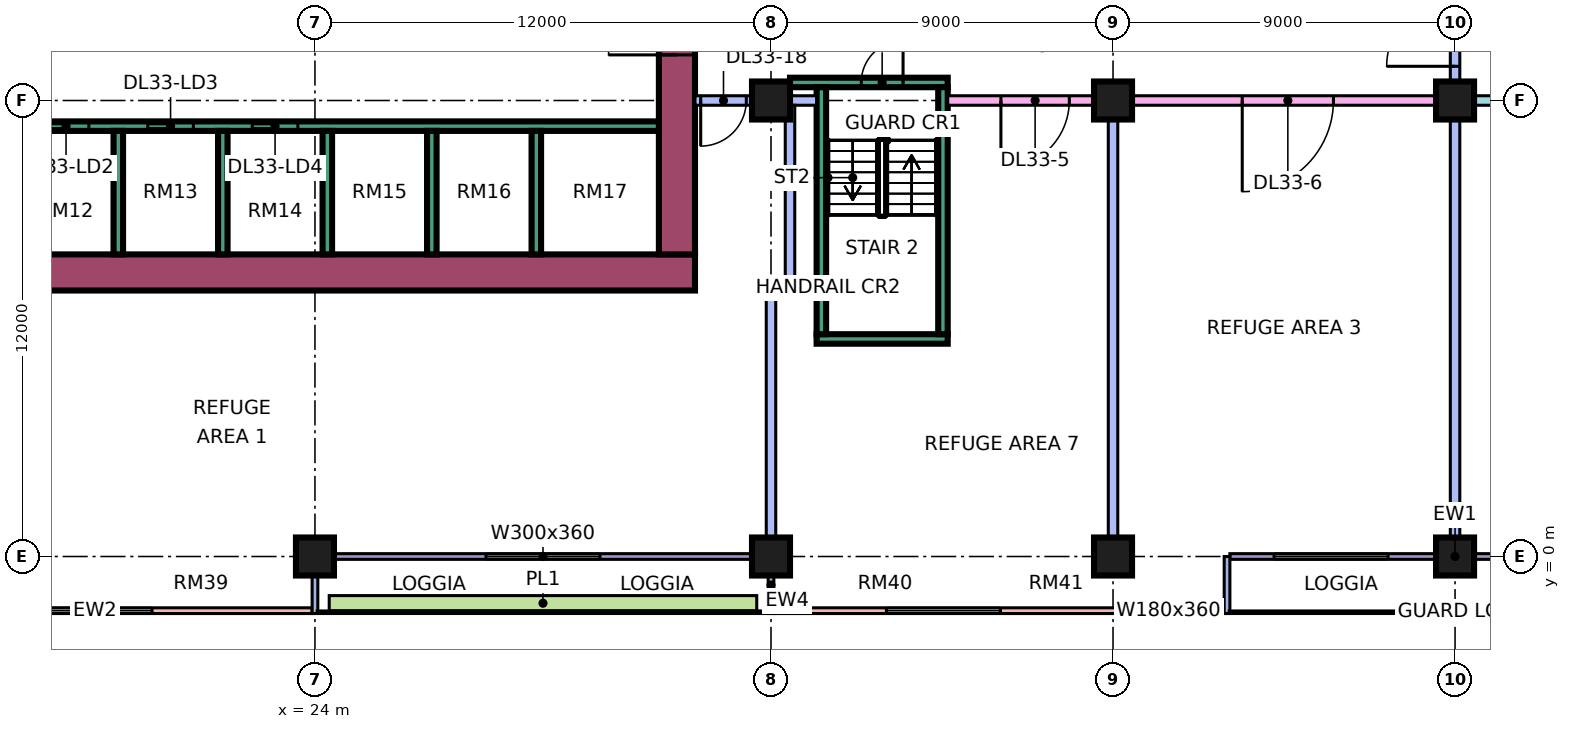
"""IFC4 building model, lengths in metres.
Left out: names, types, materials, properties, quantities, classifications, styles, units other than length and angle.
Written with IfcOpenShell. Run it as: python <this file> out.ifc"""

import sys

from ifc_helpers import new_model, si_unit, direction, frame, frame_2d, origin, origin_2d, place, context, subcontext, project, spatial, rectangle, extrude, element, fill, save


model = new_model("IFC4")
c1 = context("Model", 3, precision=1e-05, world=origin(), true_north=direction((0.0, 1.0)))
c2 = subcontext(c1, "Body", "Model", "MODEL_VIEW")
j1 = project(units=[si_unit("LENGTHUNIT", "METRE"), si_unit("PLANEANGLEUNIT", "RADIAN")], contexts=[c1])
p1 = place(None, origin())
s1 = spatial("IfcSite", under=j1, at=p1, CompositionType="ELEMENT")
p2 = place(p1, origin())
s2 = spatial("IfcBuilding", under=s1, at=p2, CompositionType="ELEMENT")
p3 = place(p2, frame((0.0, 0.0, 140.65)))
s3 = spatial("IfcBuildingStorey", under=s2, at=p3, CompositionType="ELEMENT", Elevation=140.65)
for number, where, z_axis, x_axis in (
    (1, (24.0, 0.0, 0.0), (0.0, 0.0, 1.0), (1.0, 0.0, 0.0)),
    (2, (36.0, 0.0, 0.0), (0.0, 0.0, 1.0), (1.0, 0.0, 0.0)),
    (3, (36.0, 12.0, 0.0), (0.0, 0.0, 1.0), (1.0, 0.0, 0.0)),
    (4, (45.0, 0.0, 0.0), (0.0, 0.0, 1.0), (1.0, 0.0, 0.0)),
    (5, (45.0, 12.0, 0.0), (0.0, 0.0, 1.0), (1.0, 0.0, 0.0)),
    (6, (54.0, 0.0, 0.0), (0.0, 0.0, 1.0), (1.0, 0.0, 0.0)),
    (7, (54.0, 12.0, 0.0), (0.0, 0.0, 1.0), (1.0, 0.0, 0.0)),
):
    element("IfcColumn", number, at=place(p3, frame(where, z_axis=z_axis, x_axis=x_axis)), inside=s3, PredefinedType="COLUMN", context=c2, shape_type="SweptSolid", body=[
        extrude(rectangle(XDim=1.0, YDim=1.0, at=origin_2d()), origin(), (0.0, 0.0, 1.0), 5.5),
    ])
p4 = place(p3, frame((9.0, 7.475, 0.0), z_axis=(0.0, 0.0, 1.0), x_axis=(1.0, 0.0, 0.0)))
e8 = element("IfcWall", 8, at=p4, inside=s3, PredefinedType="SHEAR", context=c2, shape_type="SweptSolid", body=[
    extrude(rectangle(XDim=25.0, YDim=0.95, at=frame_2d((12.5, 0.0))), origin(), (0.0, 0.0, 1.0), 5.5),
])
p5 = place(p3, frame((33.525, 7.95, 0.0), z_axis=(0.0, 0.0, 1.0), x_axis=(0.0, 1.0, 0.0)))
e9 = element("IfcWall", 9, at=p5, inside=s3, PredefinedType="SHEAR", context=c2, shape_type="SweptSolid", body=[
    extrude(rectangle(XDim=11.1, YDim=0.95, at=frame_2d((5.55, 0.0))), origin(), (0.0, 0.0, 1.0), 5.5),
])
p6 = place(p5, frame((5.25, 0.0, 0.0)))
e10 = element("IfcOpeningElement", 10, at=p6, cuts=e9, PredefinedType="OPENING", context=c2, shape_type="SweptSolid", body=[
    extrude(rectangle(XDim=1.8, YDim=2.4, at=frame_2d((0.9, 1.2))), frame((0.0, 0.485, 0.0), z_axis=(0.0, -1.0, 0.0), x_axis=(1.0, 0.0, 0.0)), (0.0, 0.0, 1.0), 0.97),
])
p7 = place(p3, frame((13.45, 11.325, 0.0), z_axis=(0.0, 0.0, 1.0), x_axis=(1.0, 0.0, 0.0)))
e11 = element("IfcWall", 11, at=p7, inside=s3, PredefinedType="SHEAR", context=c2, shape_type="SweptSolid", body=[
    extrude(rectangle(XDim=19.6, YDim=0.25, at=frame_2d((9.8, 0.0))), origin(), (0.0, 0.0, 1.0), 5.5),
])
p8 = place(p7, frame((0.65, 0.0, 0.0)))
e12 = element("IfcOpeningElement", 12, at=p8, cuts=e11, PredefinedType="OPENING", context=c2, shape_type="SweptSolid", body=[
    extrude(rectangle(XDim=1.2, YDim=2.2, at=frame_2d((0.6, 1.1))), frame((0.0, 0.135, 0.0), z_axis=(0.0, -1.0, 0.0), x_axis=(1.0, 0.0, 0.0)), (0.0, 0.0, 1.0), 0.27),
])
p9 = place(p7, frame((3.4, 0.0, 0.0)))
e13 = element("IfcOpeningElement", 13, at=p9, cuts=e11, PredefinedType="OPENING", context=c2, shape_type="SweptSolid", body=[
    extrude(rectangle(XDim=1.2, YDim=2.2, at=frame_2d((0.6, 1.1))), frame((0.0, 0.135, 0.0), z_axis=(0.0, -1.0, 0.0), x_axis=(1.0, 0.0, 0.0)), (0.0, 0.0, 1.0), 0.27),
])
p10 = place(p7, frame((6.15, 0.0, 0.0)))
e14 = element("IfcOpeningElement", 14, at=p10, cuts=e11, PredefinedType="OPENING", context=c2, shape_type="SweptSolid", body=[
    extrude(rectangle(XDim=1.2, YDim=2.2, at=frame_2d((0.6, 1.1))), frame((0.0, 0.135, 0.0), z_axis=(0.0, -1.0, 0.0), x_axis=(1.0, 0.0, 0.0)), (0.0, 0.0, 1.0), 0.27),
])
p11 = place(p7, frame((8.9, 0.0, 0.0)))
e15 = element("IfcOpeningElement", 15, at=p11, cuts=e11, PredefinedType="OPENING", context=c2, shape_type="SweptSolid", body=[
    extrude(rectangle(XDim=1.2, YDim=2.2, at=frame_2d((0.6, 1.1))), frame((0.0, 0.135, 0.0), z_axis=(0.0, -1.0, 0.0), x_axis=(1.0, 0.0, 0.0)), (0.0, 0.0, 1.0), 0.27),
])
for number, where, z_axis, x_axis in (
    (16, (18.825, 7.95, 0.0), (0.0, 0.0, 1.0), (0.0, 1.0, 0.0)),
    (17, (21.575, 7.95, 0.0), (0.0, 0.0, 1.0), (0.0, 1.0, 0.0)),
    (18, (24.325, 7.95, 0.0), (0.0, 0.0, 1.0), (0.0, 1.0, 0.0)),
    (19, (27.075, 7.95, 0.0), (0.0, 0.0, 1.0), (0.0, 1.0, 0.0)),
    (20, (29.825, 7.95, 0.0), (0.0, 0.0, 1.0), (0.0, 1.0, 0.0)),
):
    element("IfcWall", number, at=place(p3, frame(where, z_axis=z_axis, x_axis=x_axis)), inside=s3, PredefinedType="SHEAR", context=c2, shape_type="SweptSolid", body=[
        extrude(rectangle(XDim=3.25, YDim=0.25, at=frame_2d((1.625, 0.0))), origin(), (0.0, 0.0, 1.0), 5.5),
    ])
p12 = place(p3, frame((37.2, 5.725, 0.0), z_axis=(0.0, 0.0, 1.0), x_axis=(1.0, 0.0, 0.0)))
e21 = element("IfcWall", 21, at=p12, inside=s3, PredefinedType="SHEAR", context=c2, shape_type="SweptSolid", body=[
    extrude(rectangle(XDim=3.45, YDim=0.25, at=frame_2d((1.725, 0.0))), origin(), (0.0, 0.0, 1.0), 5.5),
])
p13 = place(p3, frame((36.5, 12.475, 0.0), z_axis=(0.0, 0.0, 1.0), x_axis=(1.0, 0.0, 0.0)))
e22 = element("IfcWall", 22, at=p13, inside=s3, PredefinedType="SHEAR", context=c2, shape_type="SweptSolid", body=[
    extrude(rectangle(XDim=4.15, YDim=0.25, at=frame_2d((2.075, 0.0))), origin(), (0.0, 0.0, 1.0), 5.5),
])
p14 = place(p13, frame((1.875, 0.0, 0.0)))
e23 = element("IfcOpeningElement", 23, at=p14, cuts=e22, PredefinedType="OPENING", context=c2, shape_type="SweptSolid", body=[
    extrude(rectangle(XDim=1.1, YDim=2.2, at=frame_2d((0.55, 1.1))), frame((0.0, 0.135, 0.0), z_axis=(0.0, -1.0, 0.0), x_axis=(1.0, 0.0, 0.0)), (0.0, 0.0, 1.0), 0.27),
])
for number, where, z_axis, x_axis in (
    (24, (37.325, 5.85, 0.0), (0.0, 0.0, 1.0), (0.0, 1.0, 0.0)),
    (25, (40.525, 5.85, 0.0), (0.0, 0.0, 1.0), (0.0, 1.0, 0.0)),
):
    element("IfcWall", number, at=place(p3, frame(where, z_axis=z_axis, x_axis=x_axis)), inside=s3, PredefinedType="SHEAR", context=c2, shape_type="SweptSolid", body=[
        extrude(rectangle(XDim=6.5, YDim=0.25, at=frame_2d((3.25, 0.0))), origin(), (0.0, 0.0, 1.0), 5.5),
    ])
p15 = place(p3, frame((12.5, -1.425, 0.0), z_axis=(0.0, 0.0, 1.0), x_axis=(1.0, 0.0, 0.0)))
e26 = element("IfcWall", 26, at=p15, inside=s3, PredefinedType="SOLIDWALL", context=c2, shape_type="SweptSolid", body=[
    extrude(rectangle(XDim=11.425, YDim=0.15, at=frame_2d((5.712, 0.0))), origin(), (0.0, 0.0, 1.0), 5.05),
])
p16 = place(p15, frame((4.212, 0.0, 0.45)))
e27 = element("IfcOpeningElement", 27, at=p16, cuts=e26, PredefinedType="OPENING", context=c2, shape_type="SweptSolid", body=[
    extrude(rectangle(XDim=3.0, YDim=3.6, at=frame_2d((1.5, 1.8))), frame((0.0, 0.085, 0.0), z_axis=(0.0, -1.0, 0.0), x_axis=(1.0, 0.0, 0.0)), (0.0, 0.0, 1.0), 0.17),
])
p17 = place(p3, frame((24.075, 0.0, 0.0), z_axis=(0.0, 0.0, 1.0), x_axis=(1.0, 0.0, 0.0)))
e28 = element("IfcWall", 28, at=p17, inside=s3, PredefinedType="SOLIDWALL", context=c2, shape_type="SweptSolid", body=[
    extrude(rectangle(XDim=11.85, YDim=0.15, at=frame_2d((5.925, 0.0))), origin(), (0.0, 0.0, 1.0), 5.05),
])
p18 = place(p17, frame((4.425, 0.0, 0.45)))
e29 = element("IfcOpeningElement", 29, at=p18, cuts=e28, PredefinedType="OPENING", context=c2, shape_type="SweptSolid", body=[
    extrude(rectangle(XDim=3.0, YDim=3.6, at=frame_2d((1.5, 1.8))), frame((0.0, 0.085, 0.0), z_axis=(0.0, -1.0, 0.0), x_axis=(1.0, 0.0, 0.0)), (0.0, 0.0, 1.0), 0.17),
])
for number, where, z_axis, x_axis in (
    (30, (24.0, -1.5, 0.0), (0.0, 0.0, 1.0), (0.0, 1.0, 0.0)),
    (31, (36.0, -1.5, 0.0), (0.0, 0.0, 1.0), (0.0, 1.0, 0.0)),
):
    element("IfcWall", number, at=place(p3, frame(where, z_axis=z_axis, x_axis=x_axis)), inside=s3, PredefinedType="SOLIDWALL", context=c2, shape_type="SweptSolid", body=[
        extrude(rectangle(XDim=1.5, YDim=0.15, at=frame_2d((0.75, 0.0))), origin(), (0.0, 0.0, 1.0), 5.05),
    ])
p19 = place(p3, frame((36.075, -1.425, 0.0), z_axis=(0.0, 0.0, 1.0), x_axis=(1.0, 0.0, 0.0)))
e32 = element("IfcWall", 32, at=p19, inside=s3, PredefinedType="SOLIDWALL", context=c2, shape_type="SweptSolid", body=[
    extrude(rectangle(XDim=11.85, YDim=0.15, at=frame_2d((5.925, 0.0))), origin(), (0.0, 0.0, 1.0), 5.05),
])
p20 = place(p19, frame((2.962, 0.0, 0.45)))
e33 = element("IfcOpeningElement", 33, at=p20, cuts=e32, PredefinedType="OPENING", context=c2, shape_type="SweptSolid", body=[
    extrude(rectangle(XDim=3.0, YDim=3.6, at=frame_2d((1.5, 1.8))), frame((0.0, 0.085, 0.0), z_axis=(0.0, -1.0, 0.0), x_axis=(1.0, 0.0, 0.0)), (0.0, 0.0, 1.0), 0.17),
])
p21 = place(p19, frame((9.488, 0.0, 0.45)))
e34 = element("IfcOpeningElement", 34, at=p21, cuts=e32, PredefinedType="OPENING", context=c2, shape_type="SweptSolid", body=[
    extrude(rectangle(XDim=1.8, YDim=3.6, at=frame_2d((0.9, 1.8))), frame((0.0, 0.085, 0.0), z_axis=(0.0, -1.0, 0.0), x_axis=(1.0, 0.0, 0.0)), (0.0, 0.0, 1.0), 0.17),
])
p22 = place(p3, frame((48.075, 0.0, 0.0), z_axis=(0.0, 0.0, 1.0), x_axis=(1.0, 0.0, 0.0)))
e35 = element("IfcWall", 35, at=p22, inside=s3, PredefinedType="SOLIDWALL", context=c2, shape_type="SweptSolid", body=[
    extrude(rectangle(XDim=11.85, YDim=0.15, at=frame_2d((5.925, 0.0))), origin(), (0.0, 0.0, 1.0), 5.05),
])
p23 = place(p22, frame((1.163, 0.0, 0.45)))
e36 = element("IfcOpeningElement", 36, at=p23, cuts=e35, PredefinedType="OPENING", context=c2, shape_type="SweptSolid", body=[
    extrude(rectangle(XDim=3.0, YDim=3.6, at=frame_2d((1.5, 1.8))), frame((0.0, 0.085, 0.0), z_axis=(0.0, -1.0, 0.0), x_axis=(1.0, 0.0, 0.0)), (0.0, 0.0, 1.0), 0.17),
])
p24 = place(p3, frame((48.0, -1.5, 0.0), z_axis=(0.0, 0.0, 1.0), x_axis=(0.0, 1.0, 0.0)))
e37 = element("IfcWall", 37, at=p24, inside=s3, PredefinedType="SOLIDWALL", context=c2, shape_type="SweptSolid", body=[
    extrude(rectangle(XDim=1.5, YDim=0.15, at=frame_2d((0.75, 0.0))), origin(), (0.0, 0.0, 1.0), 5.05),
])
p25 = place(p3, frame((24.375, -1.229, 0.0), z_axis=(0.0, 0.0, 1.0), x_axis=(1.0, 0.0, 0.0)))
e38 = element("IfcWall", 38, at=p25, inside=s3, PredefinedType="SOLIDWALL", context=c2, shape_type="SweptSolid", body=[
    extrude(rectangle(XDim=11.25, YDim=0.4, at=frame_2d((5.625, 0.0))), origin(), (0.0, 0.0, 1.0), 0.7),
])
p26 = place(p3, frame((34.0, 12.0, 0.0), z_axis=(0.0, 0.0, 1.0), x_axis=(1.0, 0.0, 0.0)))
e39 = element("IfcWall", 39, at=p26, inside=s3, PredefinedType="PARTITIONING", context=c2, shape_type="SweptSolid", body=[
    extrude(rectangle(XDim=3.2, YDim=0.25, at=frame_2d((1.6, 0.0))), origin(), (0.0, 0.0, 1.0), 5.05),
])
p27 = place(p26, frame((0.15, 0.0, 0.0)))
e40 = element("IfcOpeningElement", 40, at=p27, cuts=e39, PredefinedType="OPENING", context=c2, shape_type="SweptSolid", body=[
    extrude(rectangle(XDim=1.2, YDim=2.1, at=frame_2d((0.6, 1.05))), frame((0.0, 0.135, 0.0), z_axis=(0.0, -1.0, 0.0), x_axis=(1.0, 0.0, 0.0)), (0.0, 0.0, 1.0), 0.27),
])
p28 = place(p3, frame((36.0, 0.0, 0.0), z_axis=(0.0, 0.0, 1.0), x_axis=(0.0, 1.0, 0.0)))
e41 = element("IfcWall", 41, at=p28, inside=s3, PredefinedType="PARTITIONING", context=c2, shape_type="SweptSolid", body=[
    extrude(rectangle(XDim=7.125, YDim=0.25, at=frame_2d((3.562, 0.0))), origin(), (0.0, 0.0, 1.0), 5.05),
])
p29 = place(p3, frame((36.125, 7.0, 0.0), z_axis=(0.0, 0.0, 1.0), x_axis=(1.0, 0.0, 0.0)))
e42 = element("IfcWall", 42, at=p29, inside=s3, PredefinedType="PARTITIONING", context=c2, shape_type="SweptSolid", body=[
    extrude(rectangle(XDim=0.25, YDim=0.25, at=frame_2d((0.125, 0.0))), origin(), (0.0, 0.0, 1.0), 5.05),
])
p30 = place(p3, frame((36.5, 6.875, 0.0), z_axis=(0.0, 0.0, 1.0), x_axis=(0.0, 1.0, 0.0)))
e43 = element("IfcWall", 43, at=p30, inside=s3, PredefinedType="PARTITIONING", context=c2, shape_type="SweptSolid", body=[
    extrude(rectangle(XDim=5.0, YDim=0.25, at=frame_2d((2.5, 0.0))), origin(), (0.0, 0.0, 1.0), 5.05),
])
p31 = place(p3, frame((40.65, 12.0, 0.0), z_axis=(0.0, 0.0, 1.0), x_axis=(1.0, 0.0, 0.0)))
e44 = element("IfcWall", 44, at=p31, inside=s3, PredefinedType="PARTITIONING", context=c2, shape_type="SweptSolid", body=[
    extrude(rectangle(XDim=13.225, YDim=0.25, at=frame_2d((6.613, 0.0))), origin(), (0.0, 0.0, 1.0), 2.45),
])
p32 = place(p31, frame((1.4, 0.0, 0.0)))
e45 = element("IfcOpeningElement", 45, at=p32, cuts=e44, PredefinedType="OPENING", context=c2, shape_type="SweptSolid", body=[
    extrude(rectangle(XDim=1.8, YDim=2.1, at=frame_2d((0.9, 1.05))), frame((0.0, 0.135, 0.0), z_axis=(0.0, -1.0, 0.0), x_axis=(1.0, 0.0, 0.0)), (0.0, 0.0, 1.0), 0.27),
])
p33 = place(p31, frame((7.75, 0.0, 0.0)))
e46 = element("IfcOpeningElement", 46, at=p33, cuts=e44, PredefinedType="OPENING", context=c2, shape_type="SweptSolid", body=[
    extrude(rectangle(XDim=2.4, YDim=2.1, at=frame_2d((1.2, 1.05))), frame((0.0, 0.135, 0.0), z_axis=(0.0, -1.0, 0.0), x_axis=(1.0, 0.0, 0.0)), (0.0, 0.0, 1.0), 0.27),
])
p34 = place(p3, frame((45.0, 0.0, 0.0), z_axis=(0.0, 0.0, 1.0), x_axis=(0.0, 1.0, 0.0)))
e47 = element("IfcWall", 47, at=p34, inside=s3, PredefinedType="PARTITIONING", context=c2, shape_type="SweptSolid", body=[
    extrude(rectangle(XDim=11.875, YDim=0.25, at=frame_2d((5.938, 0.0))), origin(), (0.0, 0.0, 1.0), 5.05),
])
p35 = place(p3, frame((54.0, 0.074, 0.0), z_axis=(0.0, 0.0, 1.0), x_axis=(0.0, 1.0, 0.0)))
e48 = element("IfcWall", 48, at=p35, inside=s3, PredefinedType="PARTITIONING", context=c2, shape_type="SweptSolid", body=[
    extrude(rectangle(XDim=15.401, YDim=0.25, at=frame_2d((7.701, 0.0))), origin(), (0.0, 0.0, 1.0), 5.05),
])
p36 = place(p35, frame((12.826, 0.0, 0.0)))
e49 = element("IfcOpeningElement", 49, at=p36, cuts=e48, PredefinedType="OPENING", context=c2, shape_type="SweptSolid", body=[
    extrude(rectangle(XDim=1.8, YDim=2.1, at=frame_2d((0.9, 1.05))), frame((0.0, 0.135, 0.0), z_axis=(0.0, -1.0, 0.0), x_axis=(1.0, 0.0, 0.0)), (0.0, 0.0, 1.0), 0.27),
])
p37 = place(p3, frame((54.125, 12.0, 0.0), z_axis=(0.0, 0.0, 1.0), x_axis=(1.0, 0.0, 0.0)))
e50 = element("IfcWall", 50, at=p37, inside=s3, PredefinedType="PARTITIONING", context=c2, shape_type="SweptSolid", body=[
    extrude(rectangle(XDim=17.875, YDim=0.25, at=frame_2d((8.938, 0.0))), origin(), (0.0, 0.0, 1.0), 2.45),
])
p38 = place(p37, frame((3.275, 0.0, 0.0)))
e51 = element("IfcOpeningElement", 51, at=p38, cuts=e50, PredefinedType="OPENING", context=c2, shape_type="SweptSolid", body=[
    extrude(rectangle(XDim=2.4, YDim=2.1, at=frame_2d((1.2, 1.05))), frame((0.0, 0.135, 0.0), z_axis=(0.0, -1.0, 0.0), x_axis=(1.0, 0.0, 0.0)), (0.0, 0.0, 1.0), 0.27),
])
p39 = place(p16, origin())
e52 = element("IfcWindow", 52, at=p39, inside=s3, PartitioningType="SINGLE_PANEL", PredefinedType="WINDOW", context=c2, shape_type="SweptSolid", body=[
    extrude(rectangle(XDim=3.0, YDim=3.6, at=frame_2d((1.5, 1.8))), frame((0.0, 0.03, 0.0), z_axis=(0.0, -1.0, 0.0), x_axis=(1.0, 0.0, 0.0)), (0.0, 0.0, 1.0), 0.06),
])
fill(e27, e52)
p40 = place(p18, origin())
e53 = element("IfcWindow", 53, at=p40, inside=s3, PartitioningType="SINGLE_PANEL", PredefinedType="WINDOW", context=c2, shape_type="SweptSolid", body=[
    extrude(rectangle(XDim=3.0, YDim=3.6, at=frame_2d((1.5, 1.8))), frame((0.0, 0.03, 0.0), z_axis=(0.0, -1.0, 0.0), x_axis=(1.0, 0.0, 0.0)), (0.0, 0.0, 1.0), 0.06),
])
fill(e29, e53)
p41 = place(p20, origin())
e54 = element("IfcWindow", 54, at=p41, inside=s3, PartitioningType="SINGLE_PANEL", PredefinedType="WINDOW", context=c2, shape_type="SweptSolid", body=[
    extrude(rectangle(XDim=3.0, YDim=3.6, at=frame_2d((1.5, 1.8))), frame((0.0, 0.03, 0.0), z_axis=(0.0, -1.0, 0.0), x_axis=(1.0, 0.0, 0.0)), (0.0, 0.0, 1.0), 0.06),
])
fill(e33, e54)
p42 = place(p21, origin())
e55 = element("IfcWindow", 55, at=p42, inside=s3, PartitioningType="SINGLE_PANEL", PredefinedType="WINDOW", context=c2, shape_type="SweptSolid", body=[
    extrude(rectangle(XDim=1.8, YDim=3.6, at=frame_2d((0.9, 1.8))), frame((0.0, 0.03, 0.0), z_axis=(0.0, -1.0, 0.0), x_axis=(1.0, 0.0, 0.0)), (0.0, 0.0, 1.0), 0.06),
])
fill(e34, e55)
p43 = place(p23, origin())
e56 = element("IfcWindow", 56, at=p43, inside=s3, PartitioningType="SINGLE_PANEL", PredefinedType="WINDOW", context=c2, shape_type="SweptSolid", body=[
    extrude(rectangle(XDim=3.0, YDim=3.6, at=frame_2d((1.5, 1.8))), frame((0.0, 0.03, 0.0), z_axis=(0.0, -1.0, 0.0), x_axis=(1.0, 0.0, 0.0)), (0.0, 0.0, 1.0), 0.06),
])
fill(e36, e56)
p44 = place(p9, origin())
e57 = element("IfcDoor", 57, at=p44, inside=s3, OperationType="DOUBLE_DOOR_SLIDING", PredefinedType="DOOR", context=c2, shape_type="SweptSolid", body=[
    extrude(rectangle(XDim=1.2, YDim=2.2, at=frame_2d((0.6, 1.1))), frame((0.0, 0.025, 0.0), z_axis=(0.0, -1.0, 0.0), x_axis=(1.0, 0.0, 0.0)), (0.0, 0.0, 1.0), 0.05),
])
fill(e13, e57)
p45 = place(p10, origin())
e58 = element("IfcDoor", 58, at=p45, inside=s3, OperationType="DOUBLE_DOOR_SLIDING", PredefinedType="DOOR", context=c2, shape_type="SweptSolid", body=[
    extrude(rectangle(XDim=1.2, YDim=2.2, at=frame_2d((0.6, 1.1))), frame((0.0, 0.025, 0.0), z_axis=(0.0, -1.0, 0.0), x_axis=(1.0, 0.0, 0.0)), (0.0, 0.0, 1.0), 0.05),
])
fill(e14, e58)
p46 = place(p11, origin())
e59 = element("IfcDoor", 59, at=p46, inside=s3, OperationType="DOUBLE_DOOR_SLIDING", PredefinedType="DOOR", context=c2, shape_type="SweptSolid", body=[
    extrude(rectangle(XDim=1.2, YDim=2.2, at=frame_2d((0.6, 1.1))), frame((0.0, 0.025, 0.0), z_axis=(0.0, -1.0, 0.0), x_axis=(1.0, 0.0, 0.0)), (0.0, 0.0, 1.0), 0.05),
])
fill(e15, e59)
p47 = place(p6, origin())
e60 = element("IfcDoor", 60, at=p47, inside=s3, OperationType="DOUBLE_DOOR_SINGLE_SWING", PredefinedType="DOOR", context=c2, shape_type="SweptSolid", body=[
    extrude(rectangle(XDim=1.8, YDim=2.4, at=frame_2d((0.9, 1.2))), frame((0.0, 0.025, 0.0), z_axis=(0.0, -1.0, 0.0), x_axis=(1.0, 0.0, 0.0)), (0.0, 0.0, 1.0), 0.05),
])
fill(e10, e60)
p48 = place(p14, frame((1.1, 0.0, 0.0), z_axis=(0.0, 0.0, 1.0), x_axis=(-1.0, 0.0, 0.0)))
e61 = element("IfcDoor", 61, at=p48, inside=s3, OperationType="SINGLE_SWING_RIGHT", PredefinedType="DOOR", context=c2, shape_type="SweptSolid", body=[
    extrude(rectangle(XDim=1.1, YDim=2.2, at=frame_2d((0.55, 1.1))), frame((0.0, 0.025, 0.0), z_axis=(0.0, -1.0, 0.0), x_axis=(1.0, 0.0, 0.0)), (0.0, 0.0, 1.0), 0.05),
])
fill(e23, e61)
p49 = place(p32, frame((1.8, 0.0, 0.0), z_axis=(0.0, 0.0, 1.0), x_axis=(-1.0, 0.0, 0.0)))
e62 = element("IfcDoor", 62, at=p49, inside=s3, OperationType="DOUBLE_DOOR_SINGLE_SWING", PredefinedType="DOOR", context=c2, shape_type="SweptSolid", body=[
    extrude(rectangle(XDim=1.8, YDim=2.1, at=frame_2d((0.9, 1.05))), frame((0.0, 0.025, 0.0), z_axis=(0.0, -1.0, 0.0), x_axis=(1.0, 0.0, 0.0)), (0.0, 0.0, 1.0), 0.05),
])
fill(e45, e62)
p50 = place(p33, frame((2.4, 0.0, 0.0), z_axis=(0.0, 0.0, 1.0), x_axis=(-1.0, 0.0, 0.0)))
e63 = element("IfcDoor", 63, at=p50, inside=s3, OperationType="DOUBLE_DOOR_SINGLE_SWING", PredefinedType="DOOR", context=c2, shape_type="SweptSolid", body=[
    extrude(rectangle(XDim=2.4, YDim=2.1, at=frame_2d((1.2, 1.05))), frame((0.0, 0.025, 0.0), z_axis=(0.0, -1.0, 0.0), x_axis=(1.0, 0.0, 0.0)), (0.0, 0.0, 1.0), 0.05),
])
fill(e46, e63)
p51 = place(p27, frame((1.2, 0.0, 0.0), z_axis=(0.0, 0.0, 1.0), x_axis=(-1.0, 0.0, 0.0)))
e64 = element("IfcDoor", 64, at=p51, inside=s3, OperationType="SINGLE_SWING_LEFT", PredefinedType="DOOR", context=c2, shape_type="SweptSolid", body=[
    extrude(rectangle(XDim=1.2, YDim=2.1, at=frame_2d((0.6, 1.05))), frame((0.0, 0.025, 0.0), z_axis=(0.0, -1.0, 0.0), x_axis=(1.0, 0.0, 0.0)), (0.0, 0.0, 1.0), 0.05),
])
fill(e40, e64)
p52 = place(p36, origin())
e65 = element("IfcDoor", 65, at=p52, inside=s3, OperationType="DOUBLE_DOOR_SINGLE_SWING", PredefinedType="DOOR", context=c2, shape_type="SweptSolid", body=[
    extrude(rectangle(XDim=1.8, YDim=2.1, at=frame_2d((0.9, 1.05))), frame((0.0, 0.025, 0.0), z_axis=(0.0, -1.0, 0.0), x_axis=(1.0, 0.0, 0.0)), (0.0, 0.0, 1.0), 0.05),
])
fill(e49, e65)
save(model, sys.argv[1])
